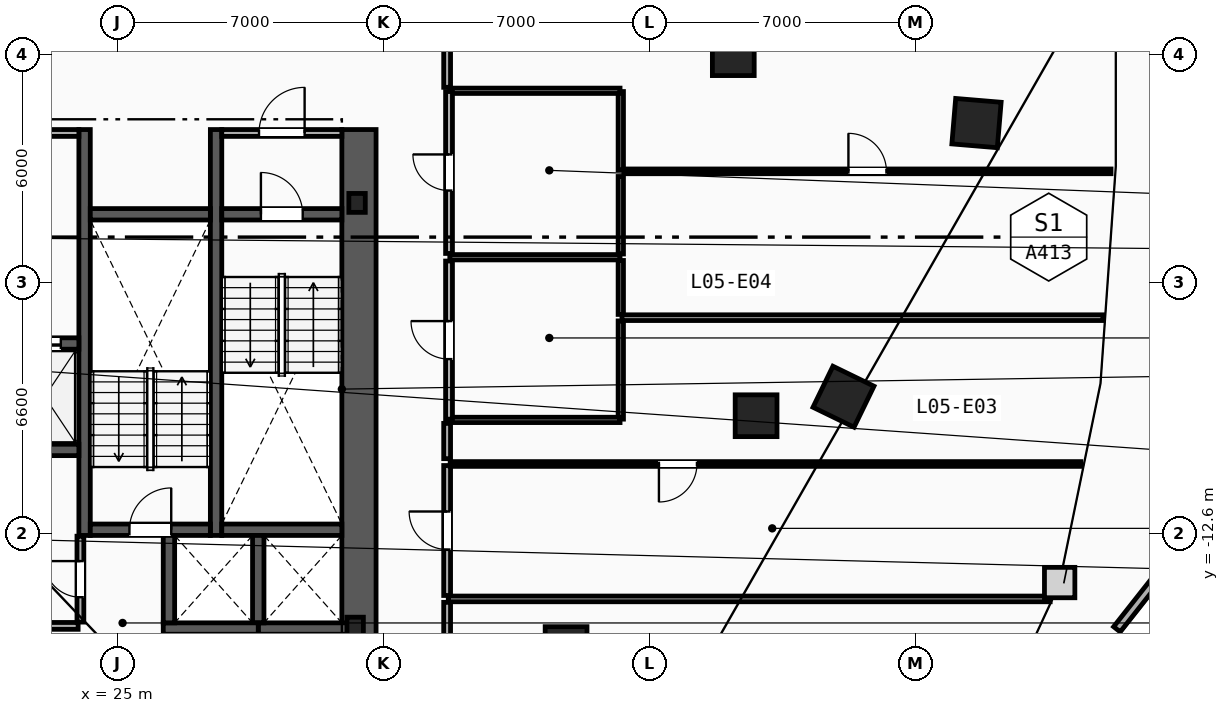
"""IFC4 building model, lengths in metres.
Left out: names, types, materials, properties, quantities, classifications, styles, units other than length and angle.
Written with IfcOpenShell. Run it as: python <this file> out.ifc"""

import sys

from ifc_helpers import new_model, si_unit, direction, frame, frame_2d, origin, origin_2d, place, context, subcontext, project, spatial, rectangle, i_section, extrude, element, fill, save


model = new_model("IFC4")
c1 = context("Model", 3, precision=1e-05, world=origin(), true_north=direction((0.0, 1.0)))
c2 = subcontext(c1, "Body", "Model", "MODEL_VIEW")
j1 = project(units=[si_unit("LENGTHUNIT", "METRE"), si_unit("PLANEANGLEUNIT", "RADIAN")], contexts=[c1])
p1 = place(None, origin())
s1 = spatial("IfcSite", under=j1, at=p1, CompositionType="ELEMENT")
p2 = place(p1, origin())
s2 = spatial("IfcBuilding", under=s1, at=p2, CompositionType="ELEMENT")
p3 = place(p2, frame((0.0, 0.0, 24.0)))
s3 = spatial("IfcBuildingStorey", under=s2, at=p3, CompositionType="ELEMENT", Elevation=24.0)
for number, where, z_axis, x_axis in (
    (1, (31.3, -3.9, 0.0), (0.0, 0.0, 1.0), (1.0, 0.0, 0.0)),
    (2, (31.25, -15.05, 0.0), (0.0, 0.0, 1.0), (1.0, 0.0, 0.0)),
):
    element("IfcColumn", number, at=place(p3, frame(where, z_axis=z_axis, x_axis=x_axis)), inside=s3, PredefinedType="COLUMN", context=c2, shape_type="SweptSolid", body=[
        extrude(i_section(OverallWidth=0.432, OverallDepth=0.498, WebThickness=0.056, FlangeThickness=0.089, FilletRadius=0.018, at=origin_2d()), origin(), (0.0, 0.0, 1.0), 3.8),
    ])
for number, where, z_axis, x_axis in (
    (3, (41.2, 0.0, 0.0), (0.0, 0.0, 1.0), (1.0, 0.0, 0.0)),
    (4, (41.8, -9.5, 0.0), (0.0, 0.0, 1.0), (1.0, 0.0, 0.0)),
    (5, (36.8, -15.6, 0.0), (0.0, 0.0, 1.0), (1.0, 0.0, 0.0)),
):
    element("IfcColumn", number, at=place(p3, frame(where, z_axis=z_axis, x_axis=x_axis)), inside=s3, PredefinedType="COLUMN", context=c2, shape_type="SweptSolid", body=[
        extrude(rectangle(XDim=1.1, YDim=1.1, at=origin_2d()), origin(), (0.0, 0.0, 1.0), 3.8),
    ])
for number, where, z_axis, x_axis in (
    (6, (44.1, -9.0, 0.0), (0.0, 0.0, 1.0), (0.437, 0.899, 0.0)),
    (7, (47.6, -1.8, 0.0), (0.0, 0.0, 1.0), (0.084, 0.997, 0.0)),
):
    element("IfcColumn", number, at=place(p3, frame(where, z_axis=z_axis, x_axis=x_axis)), inside=s3, PredefinedType="COLUMN", context=c2, shape_type="SweptSolid", body=[
        extrude(rectangle(XDim=1.2, YDim=1.2, at=origin_2d()), origin(), (0.0, 0.0, 1.0), 3.8),
    ])
p4 = place(p3, frame((54.249, -11.377, 0.0), z_axis=(0.0, 0.0, 1.0), x_axis=(-0.619435057485, -0.785047902716, 0.0)))
e8 = element("IfcWall", 8, at=p4, inside=s3, PredefinedType="PARAPET", context=c2, shape_type="SweptSolid", body=[
    extrude(rectangle(XDim=4.767, YDim=0.22, at=frame_2d((2.384, 0.0))), origin(), (0.0, 0.0, 1.0), 1.15),
])
p5 = place(p3, frame((31.35, -15.3, 0.0), z_axis=(0.0, 0.0, 1.0), x_axis=(0.0, 1.0, 0.0)))
e9 = element("IfcWall", 9, at=p5, inside=s3, PredefinedType="SHEAR", context=c2, shape_type="SweptSolid", body=[
    extrude(rectangle(XDim=13.33, YDim=0.9, at=frame_2d((6.665, 0.0))), origin(), (0.0, 0.0, 1.0), 3.5),
])
for number, where, z_axis, x_axis in (
    (10, (27.59, -12.65, 0.0), (0.0, 0.0, 1.0), (0.0, 1.0, 0.0)),
    (11, (24.13, -12.65, 0.0), (0.0, 0.0, 1.0), (0.0, 1.0, 0.0)),
):
    element("IfcWall", number, at=place(p3, frame(where, z_axis=z_axis, x_axis=x_axis)), inside=s3, PredefinedType="SHEAR", context=c2, shape_type="SweptSolid", body=[
        extrude(rectangle(XDim=10.68, YDim=0.3, at=frame_2d((5.34, 0.0))), origin(), (0.0, 0.0, 1.0), 3.5),
    ])
p6 = place(p3, frame((27.74, -4.2, 0.0), z_axis=(0.0, 0.0, 1.0), x_axis=(1.0, 0.0, 0.0)))
e12 = element("IfcWall", 12, at=p6, inside=s3, PredefinedType="SHEAR", context=c2, shape_type="SweptSolid", body=[
    extrude(rectangle(XDim=3.16, YDim=0.3, at=frame_2d((1.58, 0.0))), origin(), (0.0, 0.0, 1.0), 3.5),
])
p7 = place(p6, frame((1.03, 0.0, 0.0)))
e13 = element("IfcOpeningElement", 13, at=p7, cuts=e12, PredefinedType="OPENING", context=c2, shape_type="SweptSolid", body=[
    extrude(rectangle(XDim=1.1, YDim=2.15, at=frame_2d((0.55, 1.075))), frame((0.0, 0.16, 0.0), z_axis=(0.0, -1.0, 0.0), x_axis=(1.0, 0.0, 0.0)), (0.0, 0.0, 1.0), 0.32),
])
p8 = place(p3, frame((27.74, -12.5, 0.0), z_axis=(0.0, 0.0, 1.0), x_axis=(1.0, 0.0, 0.0)))
e14 = element("IfcWall", 14, at=p8, inside=s3, PredefinedType="SHEAR", context=c2, shape_type="SweptSolid", body=[
    extrude(rectangle(XDim=3.16, YDim=0.3, at=frame_2d((1.58, 0.0))), origin(), (0.0, 0.0, 1.0), 3.5),
])
p9 = place(p3, frame((24.28, -12.5, 0.0), z_axis=(0.0, 0.0, 1.0), x_axis=(1.0, 0.0, 0.0)))
e15 = element("IfcWall", 15, at=p9, inside=s3, PredefinedType="SHEAR", context=c2, shape_type="SweptSolid", body=[
    extrude(rectangle(XDim=3.16, YDim=0.3, at=frame_2d((1.58, 0.0))), origin(), (0.0, 0.0, 1.0), 3.5),
])
p10 = place(p9, frame((1.03, 0.0, 0.0)))
e16 = element("IfcOpeningElement", 16, at=p10, cuts=e15, PredefinedType="OPENING", context=c2, shape_type="SweptSolid", body=[
    extrude(rectangle(XDim=1.1, YDim=2.15, at=frame_2d((0.55, 1.075))), frame((0.0, 0.16, 0.0), z_axis=(0.0, -1.0, 0.0), x_axis=(1.0, 0.0, 0.0)), (0.0, 0.0, 1.0), 0.32),
])
p11 = place(p3, frame((24.28, -4.2, 0.0), z_axis=(0.0, 0.0, 1.0), x_axis=(1.0, 0.0, 0.0)))
e17 = element("IfcWall", 17, at=p11, inside=s3, PredefinedType="SHEAR", context=c2, shape_type="SweptSolid", body=[
    extrude(rectangle(XDim=3.16, YDim=0.3, at=frame_2d((1.58, 0.0))), origin(), (0.0, 0.0, 1.0), 3.5),
])
p12 = place(p3, frame((20.98, -2.06, 0.0), z_axis=(0.0, 0.0, 1.0), x_axis=(1.0, 0.0, 0.0)))
e18 = element("IfcWall", 18, at=p12, inside=s3, PredefinedType="PARTITIONING", context=c2, shape_type="SweptSolid", body=[
    extrude(rectangle(XDim=3.0, YDim=0.18, at=frame_2d((1.5, 0.0))), origin(), (0.0, 0.0, 1.0), 3.5),
])
p13 = place(p12, frame((0.9, 0.0, 0.0)))
e19 = element("IfcOpeningElement", 19, at=p13, cuts=e18, PredefinedType="OPENING", context=c2, shape_type="SweptSolid", body=[
    extrude(rectangle(XDim=1.2, YDim=2.15, at=frame_2d((0.6, 1.075))), frame((0.0, 0.1, 0.0), z_axis=(0.0, -1.0, 0.0), x_axis=(1.0, 0.0, 0.0)), (0.0, 0.0, 1.0), 0.2),
])
p14 = place(p3, frame((27.74, -2.06, 0.0), z_axis=(0.0, 0.0, 1.0), x_axis=(1.0, 0.0, 0.0)))
e20 = element("IfcWall", 20, at=p14, inside=s3, PredefinedType="PARTITIONING", context=c2, shape_type="SweptSolid", body=[
    extrude(rectangle(XDim=3.16, YDim=0.18, at=frame_2d((1.58, 0.0))), origin(), (0.0, 0.0, 1.0), 3.5),
])
p15 = place(p14, frame((0.98, 0.0, 0.0)))
e21 = element("IfcOpeningElement", 21, at=p15, cuts=e20, PredefinedType="OPENING", context=c2, shape_type="SweptSolid", body=[
    extrude(rectangle(XDim=1.2, YDim=2.15, at=frame_2d((0.6, 1.075))), frame((0.0, 0.1, 0.0), z_axis=(0.0, -1.0, 0.0), x_axis=(1.0, 0.0, 0.0)), (0.0, 0.0, 1.0), 0.2),
])
p16 = place(p3, frame((21.88, -7.6, 0.0), z_axis=(0.0, 0.0, 1.0), x_axis=(1.0, 0.0, 0.0)))
e22 = element("IfcWall", 22, at=p16, inside=s3, PredefinedType="SHEAR", context=c2, shape_type="SweptSolid", body=[
    extrude(rectangle(XDim=2.1, YDim=0.3, at=frame_2d((1.05, 0.0))), origin(), (0.0, 0.0, 1.0), 3.5),
])
p17 = place(p16, frame((0.475, 0.0, 0.0)))
e23 = element("IfcOpeningElement", 23, at=p17, cuts=e22, PredefinedType="OPENING", context=c2, shape_type="SweptSolid", body=[
    extrude(rectangle(XDim=1.15, YDim=2.2, at=frame_2d((0.575, 1.1))), frame((0.0, 0.16, 0.0), z_axis=(0.0, -1.0, 0.0), x_axis=(1.0, 0.0, 0.0)), (0.0, 0.0, 1.0), 0.32),
])
p18 = place(p3, frame((21.88, -10.4, 0.0), z_axis=(0.0, 0.0, 1.0), x_axis=(1.0, 0.0, 0.0)))
e24 = element("IfcWall", 24, at=p18, inside=s3, PredefinedType="SHEAR", context=c2, shape_type="SweptSolid", body=[
    extrude(rectangle(XDim=2.1, YDim=0.3, at=frame_2d((1.05, 0.0))), origin(), (0.0, 0.0, 1.0), 3.5),
])
p19 = place(p3, frame((28.7, -15.1, 0.0), z_axis=(0.0, 0.0, 1.0), x_axis=(1.0, 0.0, 0.0)))
e25 = element("IfcWall", 25, at=p19, inside=s3, PredefinedType="SHEAR", context=c2, shape_type="SweptSolid", body=[
    extrude(rectangle(XDim=2.5, YDim=0.3, at=frame_2d((1.25, 0.0))), origin(), (0.0, 0.0, 1.0), 3.5),
])
p20 = place(p3, frame((28.7, -14.95, 0.0), z_axis=(0.0, 0.0, 1.0), x_axis=(0.0, 1.0, 0.0)))
e26 = element("IfcWall", 26, at=p20, inside=s3, PredefinedType="SHEAR", context=c2, shape_type="SweptSolid", body=[
    extrude(rectangle(XDim=2.3, YDim=0.3, at=frame_2d((1.15, 0.0))), origin(), (0.0, 0.0, 1.0), 3.5),
])
p21 = place(p3, frame((26.2, -15.1, 0.0), z_axis=(0.0, 0.0, 1.0), x_axis=(1.0, 0.0, 0.0)))
e27 = element("IfcWall", 27, at=p21, inside=s3, PredefinedType="SHEAR", context=c2, shape_type="SweptSolid", body=[
    extrude(rectangle(XDim=2.5, YDim=0.3, at=frame_2d((1.25, 0.0))), origin(), (0.0, 0.0, 1.0), 3.5),
])
p22 = place(p3, frame((26.35, -14.95, 0.0), z_axis=(0.0, 0.0, 1.0), x_axis=(0.0, 1.0, 0.0)))
e28 = element("IfcWall", 28, at=p22, inside=s3, PredefinedType="SHEAR", context=c2, shape_type="SweptSolid", body=[
    extrude(rectangle(XDim=2.3, YDim=0.3, at=frame_2d((1.15, 0.0))), origin(), (0.0, 0.0, 1.0), 3.5),
])
p23 = place(p3, frame((21.35, -15.03, 0.0), z_axis=(0.0, 0.0, 1.0), x_axis=(1.0, 0.0, 0.0)))
e29 = element("IfcWall", 29, at=p23, inside=s3, PredefinedType="PARTITIONING", context=c2, shape_type="SweptSolid", body=[
    extrude(rectangle(XDim=2.61, YDim=0.18, at=frame_2d((1.305, 0.0))), origin(), (0.0, 0.0, 1.0), 2.573),
])
p24 = place(p3, frame((24.02, -14.93, 0.0), z_axis=(0.0, 0.0, 1.0), x_axis=(0.0, 1.0, 0.0)))
e30 = element("IfcWall", 30, at=p24, inside=s3, PredefinedType="PARTITIONING", context=c2, shape_type="SweptSolid", body=[
    extrude(rectangle(XDim=2.26, YDim=0.18, at=frame_2d((1.13, 0.0))), origin(), (0.0, 0.0, 1.0), 3.5),
])
p25 = place(p24, frame((0.655, 0.0, 0.0)))
e31 = element("IfcOpeningElement", 31, at=p25, cuts=e30, PredefinedType="OPENING", context=c2, shape_type="SweptSolid", body=[
    extrude(rectangle(XDim=0.95, YDim=2.1, at=frame_2d((0.475, 1.05))), frame((0.0, 0.1, 0.0), z_axis=(0.0, -1.0, 0.0), x_axis=(1.0, 0.0, 0.0)), (0.0, 0.0, 1.0), 0.2),
])
p26 = place(p3, frame((38.24, -9.59, 0.0), z_axis=(0.0, 0.0, 1.0), x_axis=(0.0, 1.0, 0.0)))
e32 = element("IfcWall", 32, at=p26, inside=s3, PredefinedType="PARTITIONING", context=c2, shape_type="SweptSolid", body=[
    extrude(rectangle(XDim=2.585, YDim=0.14, at=frame_2d((1.292, 0.0))), origin(), (0.0, 0.0, 1.0), 3.5),
])
p27 = place(p3, frame((38.24, -6.835, 0.0), z_axis=(0.0, 0.0, 1.0), x_axis=(0.0, 1.0, 0.0)))
e33 = element("IfcWall", 33, at=p27, inside=s3, PredefinedType="PARTITIONING", context=c2, shape_type="SweptSolid", body=[
    extrude(rectangle(XDim=1.42, YDim=0.14, at=frame_2d((0.71, 0.0))), origin(), (0.0, 0.0, 1.0), 3.5),
])
p28 = place(p3, frame((38.24, -5.245, 0.0), z_axis=(0.0, 0.0, 1.0), x_axis=(0.0, 1.0, 0.0)))
e34 = element("IfcWall", 34, at=p28, inside=s3, PredefinedType="PARTITIONING", context=c2, shape_type="SweptSolid", body=[
    extrude(rectangle(XDim=2.04, YDim=0.14, at=frame_2d((1.02, 0.0))), origin(), (0.0, 0.0, 1.0), 3.5),
])
p29 = place(p3, frame((38.24, -3.035, 0.0), z_axis=(0.0, 0.0, 1.0), x_axis=(0.0, 1.0, 0.0)))
e35 = element("IfcWall", 35, at=p29, inside=s3, PredefinedType="PARTITIONING", context=c2, shape_type="SweptSolid", body=[
    extrude(rectangle(XDim=2.065, YDim=0.14, at=frame_2d((1.032, 0.0))), origin(), (0.0, 0.0, 1.0), 3.5),
])
for number, where, z_axis, x_axis in (
    (36, (33.74, -0.95, 0.0), (0.0, 0.0, 1.0), (1.0, 0.0, 0.0)),
    (37, (33.74, -5.33, 0.0), (0.0, 0.0, 1.0), (1.0, 0.0, 0.0)),
    (38, (33.74, -9.61, 0.0), (0.0, 0.0, 1.0), (1.0, 0.0, 0.0)),
):
    element("IfcWall", number, at=place(p3, frame(where, z_axis=z_axis, x_axis=x_axis)), inside=s3, PredefinedType="PARTITIONING", context=c2, shape_type="SweptSolid", body=[
        extrude(rectangle(XDim=4.48, YDim=0.14, at=frame_2d((2.24, 0.0))), origin(), (0.0, 0.0, 1.0), 3.5),
    ])
p30 = place(p3, frame((33.72, -5.23, 0.0), z_axis=(0.0, 0.0, 1.0), x_axis=(0.0, 1.0, 0.0)))
e39 = element("IfcWall", 39, at=p30, inside=s3, PredefinedType="PARTITIONING", context=c2, shape_type="SweptSolid", body=[
    extrude(rectangle(XDim=4.26, YDim=0.18, at=frame_2d((2.13, 0.0))), origin(), (0.0, 0.0, 1.0), 3.5),
])
p31 = place(p30, frame((1.655, 0.0, 0.0)))
e40 = element("IfcOpeningElement", 40, at=p31, cuts=e39, PredefinedType="OPENING", context=c2, shape_type="SweptSolid", body=[
    extrude(rectangle(XDim=0.95, YDim=2.1, at=frame_2d((0.475, 1.05))), frame((0.0, 0.1, 0.0), z_axis=(0.0, -1.0, 0.0), x_axis=(1.0, 0.0, 0.0)), (0.0, 0.0, 1.0), 0.2),
])
p32 = place(p3, frame((33.72, -9.59, 0.0), z_axis=(0.0, 0.0, 1.0), x_axis=(0.0, 1.0, 0.0)))
e41 = element("IfcWall", 41, at=p32, inside=s3, PredefinedType="PARTITIONING", context=c2, shape_type="SweptSolid", body=[
    extrude(rectangle(XDim=4.16, YDim=0.18, at=frame_2d((2.08, 0.0))), origin(), (0.0, 0.0, 1.0), 3.5),
])
p33 = place(p32, frame((1.58, 0.0, 0.0)))
e42 = element("IfcOpeningElement", 42, at=p33, cuts=e41, PredefinedType="OPENING", context=c2, shape_type="SweptSolid", body=[
    extrude(rectangle(XDim=1.0, YDim=2.15, at=frame_2d((0.5, 1.075))), frame((0.0, 0.1, 0.0), z_axis=(0.0, -1.0, 0.0), x_axis=(1.0, 0.0, 0.0)), (0.0, 0.0, 1.0), 0.2),
])
p34 = place(p3, frame((38.27, -6.92, 0.0), z_axis=(0.0, 0.0, 1.0), x_axis=(1.0, 0.0, 0.0)))
e43 = element("IfcWall", 43, at=p34, inside=s3, PredefinedType="PARTITIONING", context=c2, shape_type="SweptSolid", body=[
    extrude(rectangle(XDim=12.657, YDim=0.15, at=frame_2d((6.329, 0.0))), origin(), (0.0, 0.0, 1.0), 3.5),
])
p35 = place(p3, frame((33.7, -14.32, 0.0), z_axis=(0.0, 0.0, 1.0), x_axis=(1.0, 0.0, 0.0)))
e44 = element("IfcWall", 44, at=p35, inside=s3, PredefinedType="PARTITIONING", context=c2, shape_type="SweptSolid", body=[
    extrude(rectangle(XDim=15.838, YDim=0.15, at=frame_2d((7.919, 0.0))), origin(), (0.0, 0.0, 1.0), 3.5),
])
p36 = place(p3, frame((33.67, -17.428, 0.0), z_axis=(0.0, 0.0, 1.0), x_axis=(0.0, 1.0, 0.0)))
e45 = element("IfcWall", 45, at=p36, inside=s3, PredefinedType="PARTITIONING", context=c2, shape_type="SweptSolid", body=[
    extrude(rectangle(XDim=3.019, YDim=0.18, at=frame_2d((1.509, 0.0))), origin(), (0.0, 0.0, 1.0), 3.5),
])
p37 = place(p3, frame((33.67, -14.23, 0.0), z_axis=(0.0, 0.0, 1.0), x_axis=(0.0, 1.0, 0.0)))
e46 = element("IfcWall", 46, at=p37, inside=s3, PredefinedType="PARTITIONING", context=c2, shape_type="SweptSolid", body=[
    extrude(rectangle(XDim=3.42, YDim=0.18, at=frame_2d((1.71, 0.0))), origin(), (0.0, 0.0, 1.0), 3.5),
])
p38 = place(p37, frame((1.21, 0.0, 0.0)))
e47 = element("IfcOpeningElement", 47, at=p38, cuts=e46, PredefinedType="OPENING", context=c2, shape_type="SweptSolid", body=[
    extrude(rectangle(XDim=1.0, YDim=2.15, at=frame_2d((0.5, 1.075))), frame((0.0, 0.1, 0.0), z_axis=(0.0, -1.0, 0.0), x_axis=(1.0, 0.0, 0.0)), (0.0, 0.0, 1.0), 0.2),
])
p39 = place(p3, frame((33.67, -10.63, 0.0), z_axis=(0.0, 0.0, 1.0), x_axis=(0.0, 1.0, 0.0)))
e48 = element("IfcWall", 48, at=p39, inside=s3, PredefinedType="PARTITIONING", context=c2, shape_type="SweptSolid", body=[
    extrude(rectangle(XDim=0.928, YDim=0.18, at=frame_2d((0.464, 0.0))), origin(), (0.0, 0.0, 1.0), 3.5),
])
p40 = place(p3, frame((33.67, -0.859, 0.0), z_axis=(0.0, 0.0, 1.0), x_axis=(0.0, 1.0, 0.0)))
e49 = element("IfcWall", 49, at=p40, inside=s3, PredefinedType="PARTITIONING", context=c2, shape_type="SweptSolid", body=[
    extrude(rectangle(XDim=12.259, YDim=0.18, at=frame_2d((6.129, 0.0))), origin(), (0.0, 0.0, 1.0), 3.5),
])
p41 = place(p3, frame((50.343, -10.77, 0.0), z_axis=(0.0, 0.0, 1.0), x_axis=(-1.0, 0.0, 0.0)))
e50 = element("IfcWall", 50, at=p41, inside=s3, PredefinedType="PARTITIONING", context=c2, shape_type="SweptSolid", body=[
    extrude(rectangle(XDim=16.593, YDim=0.125, at=frame_2d((8.296, 0.0))), origin(), (0.0, 0.0, 1.0), 3.5),
])
p42 = place(p41, frame((10.099, 0.0, 0.0)))
e51 = element("IfcOpeningElement", 51, at=p42, cuts=e50, PredefinedType="OPENING", context=c2, shape_type="SweptSolid", body=[
    extrude(rectangle(XDim=1.0, YDim=2.15, at=frame_2d((0.5, 1.075))), frame((0.0, 0.073, 0.0), z_axis=(0.0, -1.0, 0.0), x_axis=(1.0, 0.0, 0.0)), (0.0, 0.0, 1.0), 0.145),
])
p43 = place(p3, frame((38.32, -3.07, 0.0), z_axis=(0.0, 0.0, 1.0), x_axis=(1.0, 0.0, 0.0)))
e52 = element("IfcWall", 52, at=p43, inside=s3, PredefinedType="PARTITIONING", context=c2, shape_type="SweptSolid", body=[
    extrude(rectangle(XDim=12.82, YDim=0.125, at=frame_2d((6.41, 0.0))), origin(), (0.0, 0.0, 1.0), 3.5),
])
p44 = place(p43, frame((5.91, 0.0, 0.0)))
e53 = element("IfcOpeningElement", 53, at=p44, cuts=e52, PredefinedType="OPENING", context=c2, shape_type="SweptSolid", body=[
    extrude(rectangle(XDim=1.0, YDim=2.15, at=frame_2d((0.5, 1.075))), frame((0.0, 0.073, 0.0), z_axis=(0.0, -1.0, 0.0), x_axis=(1.0, 0.0, 0.0)), (0.0, 0.0, 1.0), 0.145),
])
p45 = place(p7, origin())
e54 = element("IfcDoor", 54, at=p45, inside=s3, OperationType="SINGLE_SWING_LEFT", PredefinedType="DOOR", context=c2, shape_type="SweptSolid", body=[
    extrude(rectangle(XDim=1.1, YDim=2.15, at=frame_2d((0.55, 1.075))), frame((0.0, 0.025, 0.0), z_axis=(0.0, -1.0, 0.0), x_axis=(1.0, 0.0, 0.0)), (0.0, 0.0, 1.0), 0.05),
])
fill(e13, e54)
p46 = place(p10, origin())
e55 = element("IfcDoor", 55, at=p46, inside=s3, OperationType="SINGLE_SWING_RIGHT", PredefinedType="DOOR", context=c2, shape_type="SweptSolid", body=[
    extrude(rectangle(XDim=1.1, YDim=2.15, at=frame_2d((0.55, 1.075))), frame((0.0, 0.025, 0.0), z_axis=(0.0, -1.0, 0.0), x_axis=(1.0, 0.0, 0.0)), (0.0, 0.0, 1.0), 0.05),
])
fill(e16, e55)
p47 = place(p15, origin())
e56 = element("IfcDoor", 56, at=p47, inside=s3, OperationType="SINGLE_SWING_RIGHT", PredefinedType="DOOR", context=c2, shape_type="SweptSolid", body=[
    extrude(rectangle(XDim=1.2, YDim=2.15, at=frame_2d((0.6, 1.075))), frame((0.0, 0.025, 0.0), z_axis=(0.0, -1.0, 0.0), x_axis=(1.0, 0.0, 0.0)), (0.0, 0.0, 1.0), 0.05),
])
fill(e21, e56)
p48 = place(p17, origin())
e57 = element("IfcDoor", 57, at=p48, inside=s3, OperationType="SLIDING_TO_LEFT", PredefinedType="TRAPDOOR", context=c2, shape_type="SweptSolid", body=[
    extrude(rectangle(XDim=1.15, YDim=2.2, at=frame_2d((0.575, 1.1))), frame((0.0, 0.025, 0.0), z_axis=(0.0, -1.0, 0.0), x_axis=(1.0, 0.0, 0.0)), (0.0, 0.0, 1.0), 0.05),
])
fill(e23, e57)
p49 = place(p42, origin())
e58 = element("IfcDoor", 58, at=p49, inside=s3, OperationType="SINGLE_SWING_RIGHT", PredefinedType="DOOR", context=c2, shape_type="SweptSolid", body=[
    extrude(rectangle(XDim=1.0, YDim=2.15, at=frame_2d((0.5, 1.075))), frame((0.0, 0.025, 0.0), z_axis=(0.0, -1.0, 0.0), x_axis=(1.0, 0.0, 0.0)), (0.0, 0.0, 1.0), 0.05),
])
fill(e51, e58)
p50 = place(p44, origin())
e59 = element("IfcDoor", 59, at=p50, inside=s3, OperationType="SINGLE_SWING_LEFT", PredefinedType="DOOR", context=c2, shape_type="SweptSolid", body=[
    extrude(rectangle(XDim=1.0, YDim=2.15, at=frame_2d((0.5, 1.075))), frame((0.0, 0.025, 0.0), z_axis=(0.0, -1.0, 0.0), x_axis=(1.0, 0.0, 0.0)), (0.0, 0.0, 1.0), 0.05),
])
fill(e53, e59)
p51 = place(p31, origin())
e60 = element("IfcDoor", 60, at=p51, inside=s3, OperationType="SINGLE_SWING_RIGHT", PredefinedType="DOOR", context=c2, shape_type="SweptSolid", body=[
    extrude(rectangle(XDim=0.95, YDim=2.1, at=frame_2d((0.475, 1.05))), frame((0.0, 0.025, 0.0), z_axis=(0.0, -1.0, 0.0), x_axis=(1.0, 0.0, 0.0)), (0.0, 0.0, 1.0), 0.05),
])
fill(e40, e60)
p52 = place(p33, origin())
e61 = element("IfcDoor", 61, at=p52, inside=s3, OperationType="SINGLE_SWING_RIGHT", PredefinedType="DOOR", context=c2, shape_type="SweptSolid", body=[
    extrude(rectangle(XDim=1.0, YDim=2.15, at=frame_2d((0.5, 1.075))), frame((0.0, 0.025, 0.0), z_axis=(0.0, -1.0, 0.0), x_axis=(1.0, 0.0, 0.0)), (0.0, 0.0, 1.0), 0.05),
])
fill(e42, e61)
p53 = place(p38, origin())
e62 = element("IfcDoor", 62, at=p53, inside=s3, OperationType="SINGLE_SWING_RIGHT", PredefinedType="DOOR", context=c2, shape_type="SweptSolid", body=[
    extrude(rectangle(XDim=1.0, YDim=2.15, at=frame_2d((0.5, 1.075))), frame((0.0, 0.025, 0.0), z_axis=(0.0, -1.0, 0.0), x_axis=(1.0, 0.0, 0.0)), (0.0, 0.0, 1.0), 0.05),
])
fill(e47, e62)
p54 = place(p25, origin())
e63 = element("IfcDoor", 63, at=p54, inside=s3, OperationType="SINGLE_SWING_RIGHT", PredefinedType="DOOR", context=c2, shape_type="SweptSolid", body=[
    extrude(rectangle(XDim=0.95, YDim=2.1, at=frame_2d((0.475, 1.05))), frame((0.0, 0.025, 0.0), z_axis=(0.0, -1.0, 0.0), x_axis=(1.0, 0.0, 0.0)), (0.0, 0.0, 1.0), 0.05),
])
fill(e31, e63)
save(model, sys.argv[1])
